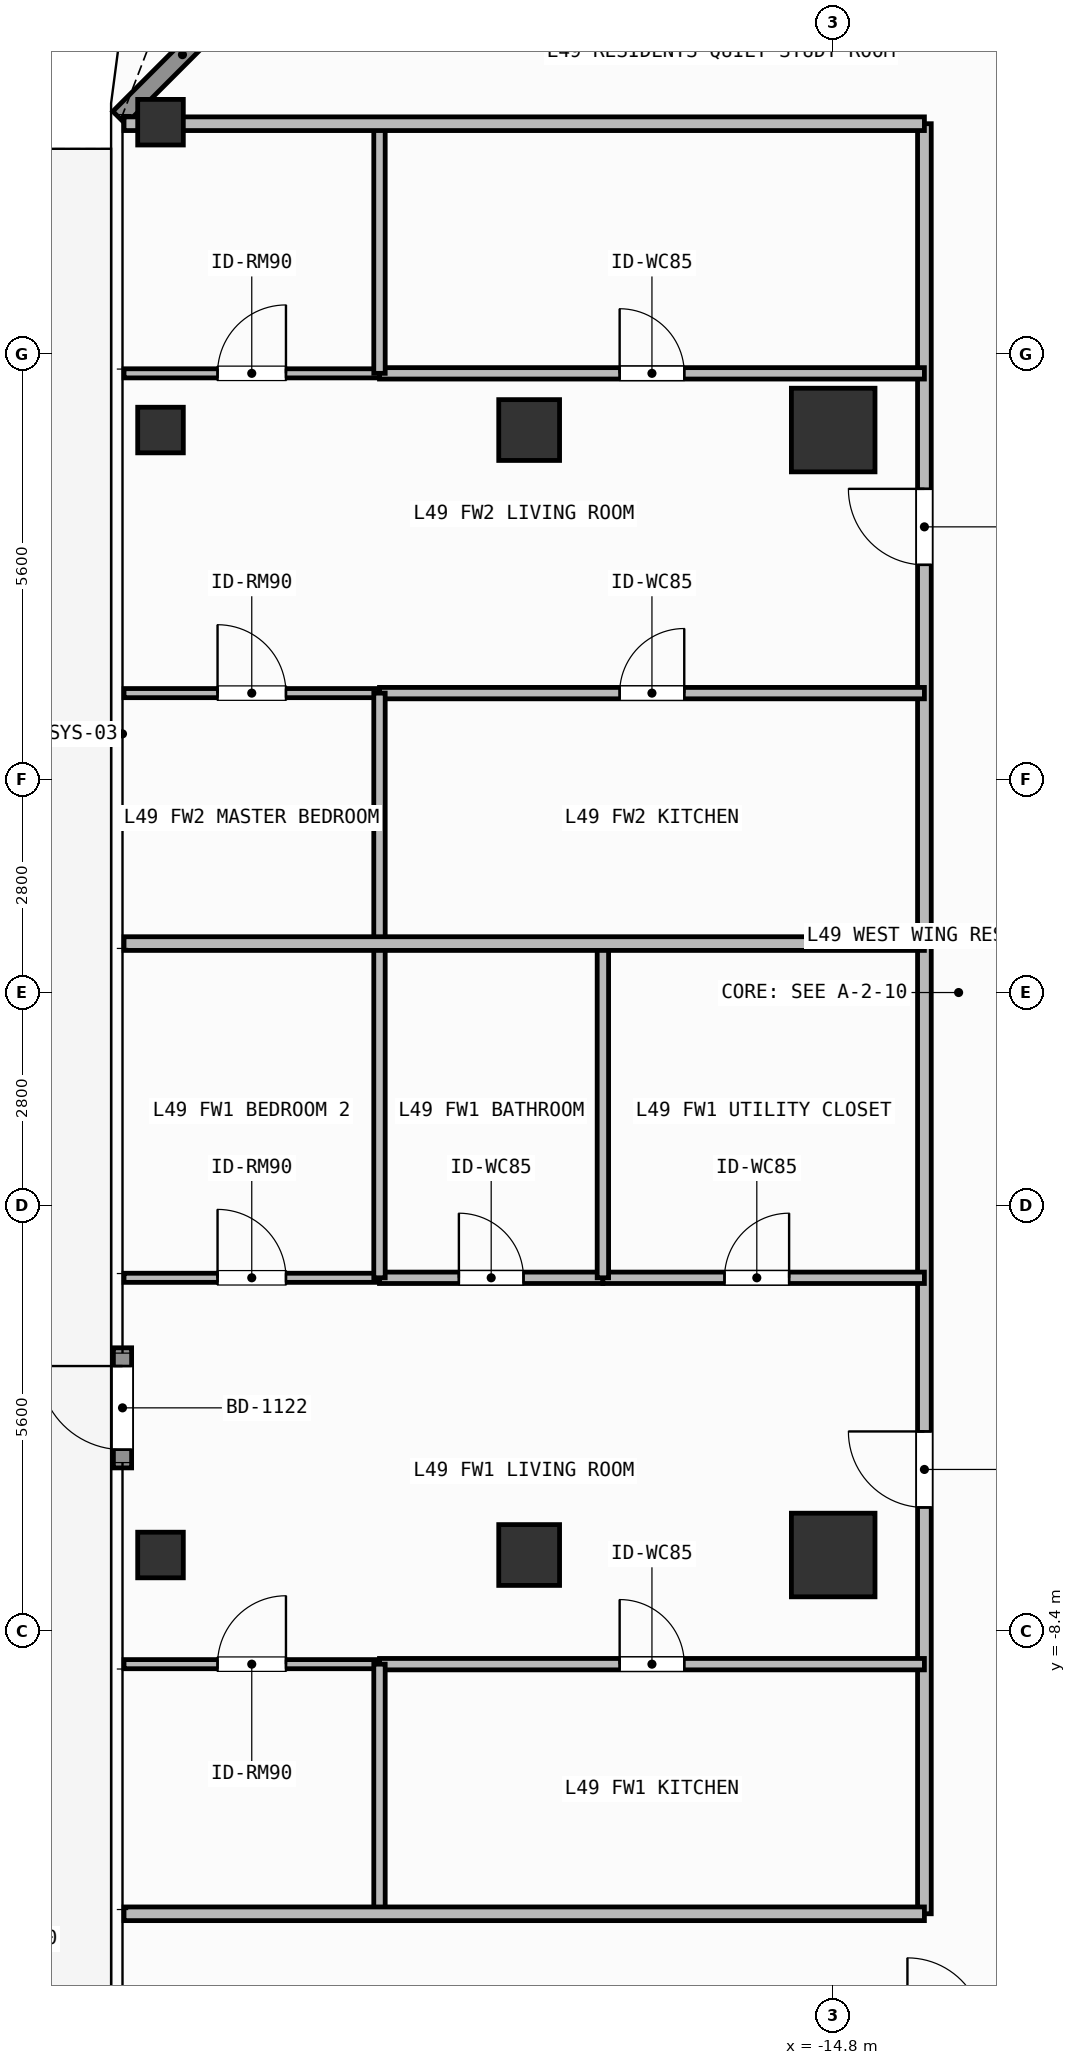
"""IFC4 building model, lengths in metres.
Left out: names, types, materials, properties, quantities, classifications, styles, units other than length and angle.
Written with IfcOpenShell. Run it as: python <this file> out.ifc"""

import sys

from ifc_helpers import new_model, si_unit, direction, frame, frame_2d, origin, origin_2d, place, context, subcontext, project, spatial, rectangle, hollow_rectangle, extrude, element, fill, save


model = new_model("IFC4")
c1 = context("Model", 3, precision=1e-05, world=origin(), true_north=direction((0.0, 1.0)))
c2 = subcontext(c1, "Body", "Model", "MODEL_VIEW")
j1 = project(units=[si_unit("LENGTHUNIT", "METRE"), si_unit("PLANEANGLEUNIT", "RADIAN")], contexts=[c1])
p1 = place(None, origin())
s1 = spatial("IfcSite", under=j1, at=p1, CompositionType="ELEMENT")
p2 = place(p1, origin())
s2 = spatial("IfcBuilding", under=s1, at=p2, CompositionType="ELEMENT")
p3 = place(p2, frame((0.0, 0.0, 199.2)))
s3 = spatial("IfcBuildingStorey", under=s2, at=p3, CompositionType="ELEMENT", Elevation=199.2)
for number, where, z_axis, x_axis in (
    (1, (-14.8, -7.4, 0.0), (0.0, 0.0, 1.0), (1.0, 0.0, 0.0)),
    (2, (-14.8, 7.4, 0.0), (0.0, 0.0, 1.0), (1.0, 0.0, 0.0)),
):
    element("IfcColumn", number, at=place(p3, frame(where, z_axis=z_axis, x_axis=x_axis)), inside=s3, PredefinedType="COLUMN", context=c2, shape_type="SweptSolid", body=[
        extrude(rectangle(XDim=1.1, YDim=1.1, at=origin_2d()), origin(), (0.0, 0.0, 1.0), 3.9),
    ])
for number, where, z_axis, x_axis in (
    (3, (-18.8, -7.4, 0.0), (0.0, 0.0, 1.0), (1.0, 0.0, 0.0)),
    (4, (-18.8, 7.4, 0.0), (0.0, 0.0, 1.0), (1.0, 0.0, 0.0)),
):
    element("IfcColumn", number, at=place(p3, frame(where, z_axis=z_axis, x_axis=x_axis)), inside=s3, PredefinedType="COLUMN", context=c2, shape_type="SweptSolid", body=[
        extrude(hollow_rectangle(XDim=0.8, YDim=0.8, WallThickness=0.036, at=origin_2d()), origin(), (0.0, 0.0, 1.0), 3.9),
    ])
for number, where, z_axis, x_axis in (
    (5, (-23.65, 11.45, 0.0), (0.0, 0.0, 1.0), (1.0, 0.0, 0.0)),
    (6, (-23.65, -7.4, 0.0), (0.0, 0.0, 1.0), (1.0, 0.0, 0.0)),
    (7, (-23.65, 7.4, 0.0), (0.0, 0.0, 1.0), (1.0, 0.0, 0.0)),
):
    element("IfcColumn", number, at=place(p3, frame(where, z_axis=z_axis, x_axis=x_axis)), inside=s3, PredefinedType="COLUMN", context=c2, shape_type="SweptSolid", body=[
        extrude(hollow_rectangle(XDim=0.6, YDim=0.6, WallThickness=0.028, at=origin_2d()), origin(), (0.0, 0.0, 1.0), 3.9),
    ])
p4 = place(p3, frame((-24.15, -6.254, 0.0), z_axis=(0.0, 0.0, 1.0), x_axis=(0.0, 1.0, 0.0)))
e8 = element("IfcWall", 8, at=p4, inside=s3, PredefinedType="SOLIDWALL", context=c2, shape_type="SweptSolid", body=[
    extrude(rectangle(XDim=1.58, YDim=0.24, at=frame_2d((0.79, 0.0))), origin(), (0.0, 0.0, 1.0), 3.68),
])
p5 = place(p4, frame((0.24, 0.0, 0.0)))
e9 = element("IfcOpeningElement", 9, at=p5, cuts=e8, PredefinedType="OPENING", context=c2, shape_type="SweptSolid", body=[
    extrude(rectangle(XDim=1.1, YDim=2.2, at=frame_2d((0.55, 1.1))), frame((0.0, 0.13, 0.0), z_axis=(0.0, -1.0, 0.0), x_axis=(1.0, 0.0, 0.0)), (0.0, 0.0, 1.0), 0.26),
])
p6 = place(p3, frame((-24.192, 11.508, 0.0), z_axis=(0.0, 0.0, 1.0), x_axis=(0.707106781187, 0.707106781187, 0.0)))
e10 = element("IfcWall", 10, at=p6, inside=s3, PredefinedType="SOLIDWALL", context=c2, shape_type="SweptSolid", body=[
    extrude(rectangle(XDim=6.201, YDim=0.24, at=frame_2d((3.101, 0.0))), origin(), (0.0, 0.0, 1.0), 3.68),
])
p7 = place(p6, frame((2.351, 0.0, 0.8)))
e11 = element("IfcOpeningElement", 11, at=p7, cuts=e10, PredefinedType="OPENING", context=c2, shape_type="SweptSolid", body=[
    extrude(rectangle(XDim=1.5, YDim=1.85, at=frame_2d((0.75, 0.925))), frame((0.0, 0.13, 0.0), z_axis=(0.0, -1.0, 0.0), x_axis=(1.0, 0.0, 0.0)), (0.0, 0.0, 1.0), 0.26),
])
p8 = place(p3, frame((-13.6, -12.12, 0.0), z_axis=(0.0, 0.0, 1.0), x_axis=(0.0, 1.0, 0.0)))
e12 = element("IfcWall", 12, at=p8, inside=s3, PredefinedType="PARTITIONING", context=c2, shape_type="SweptSolid", body=[
    extrude(rectangle(XDim=12.764, YDim=0.18, at=frame_2d((6.382, 0.0))), origin(), (0.0, 0.0, 1.0), 3.68),
])
p9 = place(p8, frame((5.346, 0.0, 0.0)))
e13 = element("IfcOpeningElement", 13, at=p9, cuts=e12, PredefinedType="OPENING", context=c2, shape_type="SweptSolid", body=[
    extrude(rectangle(XDim=1.0, YDim=2.2, at=frame_2d((0.5, 1.1))), frame((0.0, 0.1, 0.0), z_axis=(0.0, -1.0, 0.0), x_axis=(1.0, 0.0, 0.0)), (0.0, 0.0, 1.0), 0.2),
])
p10 = place(p3, frame((-20.769, -3.753, 0.0), z_axis=(0.0, 0.0, 1.0), x_axis=(1.0, 0.0, 0.0)))
e14 = element("IfcWall", 14, at=p10, inside=s3, PredefinedType="PARTITIONING", context=c2, shape_type="SweptSolid", body=[
    extrude(rectangle(XDim=2.939, YDim=0.15, at=frame_2d((1.469, 0.0))), origin(), (0.0, 0.0, 1.0), 3.68),
])
p11 = place(p10, frame((1.044, 0.0, 0.0)))
e15 = element("IfcOpeningElement", 15, at=p11, cuts=e14, PredefinedType="OPENING", context=c2, shape_type="SweptSolid", body=[
    extrude(rectangle(XDim=0.85, YDim=2.1, at=frame_2d((0.425, 1.05))), frame((0.0, 0.085, 0.0), z_axis=(0.0, -1.0, 0.0), x_axis=(1.0, 0.0, 0.0)), (0.0, 0.0, 1.0), 0.17),
])
p12 = place(p3, frame((-17.83, -3.753, 0.0), z_axis=(0.0, 0.0, 1.0), x_axis=(1.0, 0.0, 0.0)))
e16 = element("IfcWall", 16, at=p12, inside=s3, PredefinedType="PARTITIONING", context=c2, shape_type="SweptSolid", body=[
    extrude(rectangle(XDim=4.23, YDim=0.15, at=frame_2d((2.115, 0.0))), origin(), (0.0, 0.0, 1.0), 3.68),
])
p13 = place(p12, frame((1.6, 0.0, 0.0)))
e17 = element("IfcOpeningElement", 17, at=p13, cuts=e16, PredefinedType="OPENING", context=c2, shape_type="SweptSolid", body=[
    extrude(rectangle(XDim=0.85, YDim=2.1, at=frame_2d((0.425, 1.05))), frame((0.0, 0.085, 0.0), z_axis=(0.0, -1.0, 0.0), x_axis=(1.0, 0.0, 0.0)), (0.0, 0.0, 1.0), 0.17),
])
p14 = place(p3, frame((-20.769, -8.836, 0.0), z_axis=(0.0, 0.0, 1.0), x_axis=(1.0, 0.0, 0.0)))
e18 = element("IfcWall", 18, at=p14, inside=s3, PredefinedType="PARTITIONING", context=c2, shape_type="SweptSolid", body=[
    extrude(rectangle(XDim=7.169, YDim=0.15, at=frame_2d((3.584, 0.0))), origin(), (0.0, 0.0, 1.0), 3.68),
])
p15 = place(p14, frame((3.159, 0.0, 0.0)))
e19 = element("IfcOpeningElement", 19, at=p15, cuts=e18, PredefinedType="OPENING", context=c2, shape_type="SweptSolid", body=[
    extrude(rectangle(XDim=0.85, YDim=2.1, at=frame_2d((0.425, 1.05))), frame((0.0, 0.085, 0.0), z_axis=(0.0, -1.0, 0.0), x_axis=(1.0, 0.0, 0.0)), (0.0, 0.0, 1.0), 0.17),
])
p16 = place(p3, frame((-24.13, -8.836, 0.0), z_axis=(0.0, 0.0, 1.0), x_axis=(1.0, 0.0, 0.0)))
e20 = element("IfcWall", 20, at=p16, inside=s3, PredefinedType="PARTITIONING", context=c2, shape_type="SweptSolid", body=[
    extrude(rectangle(XDim=3.361, YDim=0.12, at=frame_2d((1.68, 0.0))), origin(), (0.0, 0.0, 1.0), 3.68),
])
p17 = place(p16, frame((1.23, 0.0, 0.0)))
e21 = element("IfcOpeningElement", 21, at=p17, cuts=e20, PredefinedType="OPENING", context=c2, shape_type="SweptSolid", body=[
    extrude(rectangle(XDim=0.9, YDim=2.1, at=frame_2d((0.45, 1.05))), frame((0.0, 0.07, 0.0), z_axis=(0.0, -1.0, 0.0), x_axis=(1.0, 0.0, 0.0)), (0.0, 0.0, 1.0), 0.14),
])
p18 = place(p3, frame((-24.13, -3.753, 0.0), z_axis=(0.0, 0.0, 1.0), x_axis=(1.0, 0.0, 0.0)))
e22 = element("IfcWall", 22, at=p18, inside=s3, PredefinedType="PARTITIONING", context=c2, shape_type="SweptSolid", body=[
    extrude(rectangle(XDim=3.361, YDim=0.12, at=frame_2d((1.68, 0.0))), origin(), (0.0, 0.0, 1.0), 3.68),
])
p19 = place(p18, frame((1.23, 0.0, 0.0)))
e23 = element("IfcOpeningElement", 23, at=p19, cuts=e22, PredefinedType="OPENING", context=c2, shape_type="SweptSolid", body=[
    extrude(rectangle(XDim=0.9, YDim=2.1, at=frame_2d((0.45, 1.05))), frame((0.0, 0.07, 0.0), z_axis=(0.0, -1.0, 0.0), x_axis=(1.0, 0.0, 0.0)), (0.0, 0.0, 1.0), 0.14),
])
p20 = place(p3, frame((-13.6, 0.644, 0.0), z_axis=(0.0, 0.0, 1.0), x_axis=(0.0, 1.0, 0.0)))
e24 = element("IfcWall", 24, at=p20, inside=s3, PredefinedType="PARTITIONING", context=c2, shape_type="SweptSolid", body=[
    extrude(rectangle(XDim=10.786, YDim=0.18, at=frame_2d((5.393, 0.0))), origin(), (0.0, 0.0, 1.0), 3.68),
])
p21 = place(p20, frame((4.982, 0.0, 0.0)))
e25 = element("IfcOpeningElement", 25, at=p21, cuts=e24, PredefinedType="OPENING", context=c2, shape_type="SweptSolid", body=[
    extrude(rectangle(XDim=1.0, YDim=2.2, at=frame_2d((0.5, 1.1))), frame((0.0, 0.1, 0.0), z_axis=(0.0, -1.0, 0.0), x_axis=(1.0, 0.0, 0.0)), (0.0, 0.0, 1.0), 0.2),
])
p22 = place(p3, frame((-20.769, 8.146, 0.0), z_axis=(0.0, 0.0, 1.0), x_axis=(1.0, 0.0, 0.0)))
e26 = element("IfcWall", 26, at=p22, inside=s3, PredefinedType="PARTITIONING", context=c2, shape_type="SweptSolid", body=[
    extrude(rectangle(XDim=7.169, YDim=0.15, at=frame_2d((3.584, 0.0))), origin(), (0.0, 0.0, 1.0), 3.68),
])
p23 = place(p22, frame((3.159, 0.0, 0.0)))
e27 = element("IfcOpeningElement", 27, at=p23, cuts=e26, PredefinedType="OPENING", context=c2, shape_type="SweptSolid", body=[
    extrude(rectangle(XDim=0.85, YDim=2.1, at=frame_2d((0.425, 1.05))), frame((0.0, 0.085, 0.0), z_axis=(0.0, -1.0, 0.0), x_axis=(1.0, 0.0, 0.0)), (0.0, 0.0, 1.0), 0.17),
])
p24 = place(p3, frame((-20.769, 3.939, 0.0), z_axis=(0.0, 0.0, 1.0), x_axis=(1.0, 0.0, 0.0)))
e28 = element("IfcWall", 28, at=p24, inside=s3, PredefinedType="PARTITIONING", context=c2, shape_type="SweptSolid", body=[
    extrude(rectangle(XDim=7.169, YDim=0.15, at=frame_2d((3.584, 0.0))), origin(), (0.0, 0.0, 1.0), 3.68),
])
p25 = place(p24, frame((3.159, 0.0, 0.0)))
e29 = element("IfcOpeningElement", 29, at=p25, cuts=e28, PredefinedType="OPENING", context=c2, shape_type="SweptSolid", body=[
    extrude(rectangle(XDim=0.85, YDim=2.1, at=frame_2d((0.425, 1.05))), frame((0.0, 0.085, 0.0), z_axis=(0.0, -1.0, 0.0), x_axis=(1.0, 0.0, 0.0)), (0.0, 0.0, 1.0), 0.17),
])
p26 = place(p3, frame((-24.13, 3.939, 0.0), z_axis=(0.0, 0.0, 1.0), x_axis=(1.0, 0.0, 0.0)))
e30 = element("IfcWall", 30, at=p26, inside=s3, PredefinedType="PARTITIONING", context=c2, shape_type="SweptSolid", body=[
    extrude(rectangle(XDim=3.361, YDim=0.12, at=frame_2d((1.68, 0.0))), origin(), (0.0, 0.0, 1.0), 3.68),
])
p27 = place(p26, frame((1.23, 0.0, 0.0)))
e31 = element("IfcOpeningElement", 31, at=p27, cuts=e30, PredefinedType="OPENING", context=c2, shape_type="SweptSolid", body=[
    extrude(rectangle(XDim=0.9, YDim=2.1, at=frame_2d((0.45, 1.05))), frame((0.0, 0.07, 0.0), z_axis=(0.0, -1.0, 0.0), x_axis=(1.0, 0.0, 0.0)), (0.0, 0.0, 1.0), 0.14),
])
p28 = place(p3, frame((-24.13, 8.146, 0.0), z_axis=(0.0, 0.0, 1.0), x_axis=(1.0, 0.0, 0.0)))
e32 = element("IfcWall", 32, at=p28, inside=s3, PredefinedType="PARTITIONING", context=c2, shape_type="SweptSolid", body=[
    extrude(rectangle(XDim=3.361, YDim=0.12, at=frame_2d((1.68, 0.0))), origin(), (0.0, 0.0, 1.0), 3.68),
])
p29 = place(p28, frame((1.23, 0.0, 0.0)))
e33 = element("IfcOpeningElement", 33, at=p29, cuts=e32, PredefinedType="OPENING", context=c2, shape_type="SweptSolid", body=[
    extrude(rectangle(XDim=0.9, YDim=2.1, at=frame_2d((0.45, 1.05))), frame((0.0, 0.07, 0.0), z_axis=(0.0, -1.0, 0.0), x_axis=(1.0, 0.0, 0.0)), (0.0, 0.0, 1.0), 0.14),
])
p30 = place(p3, frame((-17.83, -3.753, 0.0), z_axis=(0.0, 0.0, 1.0), x_axis=(0.0, 1.0, 0.0)))
e34 = element("IfcWall", 34, at=p30, inside=s3, PredefinedType="PARTITIONING", context=c2, shape_type="SweptSolid", body=[
    extrude(rectangle(XDim=4.397, YDim=0.15, at=frame_2d((2.198, 0.0))), origin(), (0.0, 0.0, 1.0), 3.68),
])
p31 = place(p3, frame((-20.769, -12.12, 0.0), z_axis=(0.0, 0.0, 1.0), x_axis=(0.0, 1.0, 0.0)))
e35 = element("IfcWall", 35, at=p31, inside=s3, PredefinedType="PARTITIONING", context=c2, shape_type="SweptSolid", body=[
    extrude(rectangle(XDim=3.284, YDim=0.15, at=frame_2d((1.642, 0.0))), origin(), (0.0, 0.0, 1.0), 3.68),
])
p32 = place(p3, frame((-20.769, -3.753, 0.0), z_axis=(0.0, 0.0, 1.0), x_axis=(0.0, 1.0, 0.0)))
e36 = element("IfcWall", 36, at=p32, inside=s3, PredefinedType="PARTITIONING", context=c2, shape_type="SweptSolid", body=[
    extrude(rectangle(XDim=4.397, YDim=0.15, at=frame_2d((2.198, 0.0))), origin(), (0.0, 0.0, 1.0), 3.68),
])
p33 = place(p3, frame((-20.769, 0.644, 0.0), z_axis=(0.0, 0.0, 1.0), x_axis=(0.0, 1.0, 0.0)))
e37 = element("IfcWall", 37, at=p33, inside=s3, PredefinedType="PARTITIONING", context=c2, shape_type="SweptSolid", body=[
    extrude(rectangle(XDim=3.295, YDim=0.15, at=frame_2d((1.647, 0.0))), origin(), (0.0, 0.0, 1.0), 3.68),
])
p34 = place(p3, frame((-20.769, 8.146, 0.0), z_axis=(0.0, 0.0, 1.0), x_axis=(0.0, 1.0, 0.0)))
e38 = element("IfcWall", 38, at=p34, inside=s3, PredefinedType="PARTITIONING", context=c2, shape_type="SweptSolid", body=[
    extrude(rectangle(XDim=3.284, YDim=0.15, at=frame_2d((1.642, 0.0))), origin(), (0.0, 0.0, 1.0), 3.68),
])
for number, where, z_axis, x_axis in (
    (39, (-24.13, 0.644, 0.0), (0.0, 0.0, 1.0), (1.0, 0.0, 0.0)),
    (40, (-24.13, -12.12, 0.0), (0.0, 0.0, 1.0), (1.0, 0.0, 0.0)),
):
    element("IfcWall", number, at=place(p3, frame(where, z_axis=z_axis, x_axis=x_axis)), inside=s3, PredefinedType="PARTITIONING", context=c2, shape_type="SweptSolid", body=[
        extrude(rectangle(XDim=10.53, YDim=0.18, at=frame_2d((5.265, 0.0))), origin(), (0.0, 0.0, 1.0), 3.68),
    ])
p35 = place(p3, frame((-24.13, 11.43, 0.0), z_axis=(0.0, 0.0, 1.0), x_axis=(1.0, 0.0, 0.0)))
e41 = element("IfcWall", 41, at=p35, inside=s3, PredefinedType="PARTITIONING", context=c2, shape_type="SweptSolid", body=[
    extrude(rectangle(XDim=10.53, YDim=0.18, at=frame_2d((5.265, 0.0))), origin(), (0.0, 0.0, 1.0), 3.42),
])
p36 = place(p5, origin())
e42 = element("IfcDoor", 42, at=p36, inside=s3, OperationType="SINGLE_SWING_RIGHT", PredefinedType="DOOR", context=c2, shape_type="SweptSolid", body=[
    extrude(rectangle(XDim=1.1, YDim=2.2, at=frame_2d((0.55, 1.1))), frame((0.0, 0.025, 0.0), z_axis=(0.0, -1.0, 0.0), x_axis=(1.0, 0.0, 0.0)), (0.0, 0.0, 1.0), 0.05),
])
fill(e9, e42)
p37 = place(p9, origin())
e43 = element("IfcDoor", 43, at=p37, inside=s3, OperationType="SINGLE_SWING_RIGHT", PredefinedType="DOOR", context=c2, shape_type="SweptSolid", body=[
    extrude(rectangle(XDim=1.0, YDim=2.2, at=frame_2d((0.5, 1.1))), frame((0.0, 0.025, 0.0), z_axis=(0.0, -1.0, 0.0), x_axis=(1.0, 0.0, 0.0)), (0.0, 0.0, 1.0), 0.05),
])
fill(e13, e43)
p38 = place(p11, origin())
e44 = element("IfcDoor", 44, at=p38, inside=s3, OperationType="SINGLE_SWING_LEFT", PredefinedType="DOOR", context=c2, shape_type="SweptSolid", body=[
    extrude(rectangle(XDim=0.85, YDim=2.1, at=frame_2d((0.425, 1.05))), frame((0.0, 0.025, 0.0), z_axis=(0.0, -1.0, 0.0), x_axis=(1.0, 0.0, 0.0)), (0.0, 0.0, 1.0), 0.05),
])
fill(e15, e44)
p39 = place(p13, origin())
e45 = element("IfcDoor", 45, at=p39, inside=s3, OperationType="SINGLE_SWING_RIGHT", PredefinedType="DOOR", context=c2, shape_type="SweptSolid", body=[
    extrude(rectangle(XDim=0.85, YDim=2.1, at=frame_2d((0.425, 1.05))), frame((0.0, 0.025, 0.0), z_axis=(0.0, -1.0, 0.0), x_axis=(1.0, 0.0, 0.0)), (0.0, 0.0, 1.0), 0.05),
])
fill(e17, e45)
p40 = place(p15, origin())
e46 = element("IfcDoor", 46, at=p40, inside=s3, OperationType="SINGLE_SWING_LEFT", PredefinedType="DOOR", context=c2, shape_type="SweptSolid", body=[
    extrude(rectangle(XDim=0.85, YDim=2.1, at=frame_2d((0.425, 1.05))), frame((0.0, 0.025, 0.0), z_axis=(0.0, -1.0, 0.0), x_axis=(1.0, 0.0, 0.0)), (0.0, 0.0, 1.0), 0.05),
])
fill(e19, e46)
p41 = place(p17, origin())
e47 = element("IfcDoor", 47, at=p41, inside=s3, OperationType="SINGLE_SWING_RIGHT", PredefinedType="DOOR", context=c2, shape_type="SweptSolid", body=[
    extrude(rectangle(XDim=0.9, YDim=2.1, at=frame_2d((0.45, 1.05))), frame((0.0, 0.025, 0.0), z_axis=(0.0, -1.0, 0.0), x_axis=(1.0, 0.0, 0.0)), (0.0, 0.0, 1.0), 0.05),
])
fill(e21, e47)
p42 = place(p19, origin())
e48 = element("IfcDoor", 48, at=p42, inside=s3, OperationType="SINGLE_SWING_LEFT", PredefinedType="DOOR", context=c2, shape_type="SweptSolid", body=[
    extrude(rectangle(XDim=0.9, YDim=2.1, at=frame_2d((0.45, 1.05))), frame((0.0, 0.025, 0.0), z_axis=(0.0, -1.0, 0.0), x_axis=(1.0, 0.0, 0.0)), (0.0, 0.0, 1.0), 0.05),
])
fill(e23, e48)
p43 = place(p21, origin())
e49 = element("IfcDoor", 49, at=p43, inside=s3, OperationType="SINGLE_SWING_RIGHT", PredefinedType="DOOR", context=c2, shape_type="SweptSolid", body=[
    extrude(rectangle(XDim=1.0, YDim=2.2, at=frame_2d((0.5, 1.1))), frame((0.0, 0.025, 0.0), z_axis=(0.0, -1.0, 0.0), x_axis=(1.0, 0.0, 0.0)), (0.0, 0.0, 1.0), 0.05),
])
fill(e25, e49)
p44 = place(p23, origin())
e50 = element("IfcDoor", 50, at=p44, inside=s3, OperationType="SINGLE_SWING_LEFT", PredefinedType="DOOR", context=c2, shape_type="SweptSolid", body=[
    extrude(rectangle(XDim=0.85, YDim=2.1, at=frame_2d((0.425, 1.05))), frame((0.0, 0.025, 0.0), z_axis=(0.0, -1.0, 0.0), x_axis=(1.0, 0.0, 0.0)), (0.0, 0.0, 1.0), 0.05),
])
fill(e27, e50)
p45 = place(p25, origin())
e51 = element("IfcDoor", 51, at=p45, inside=s3, OperationType="SINGLE_SWING_RIGHT", PredefinedType="DOOR", context=c2, shape_type="SweptSolid", body=[
    extrude(rectangle(XDim=0.85, YDim=2.1, at=frame_2d((0.425, 1.05))), frame((0.0, 0.025, 0.0), z_axis=(0.0, -1.0, 0.0), x_axis=(1.0, 0.0, 0.0)), (0.0, 0.0, 1.0), 0.05),
])
fill(e29, e51)
p46 = place(p27, origin())
e52 = element("IfcDoor", 52, at=p46, inside=s3, OperationType="SINGLE_SWING_LEFT", PredefinedType="DOOR", context=c2, shape_type="SweptSolid", body=[
    extrude(rectangle(XDim=0.9, YDim=2.1, at=frame_2d((0.45, 1.05))), frame((0.0, 0.025, 0.0), z_axis=(0.0, -1.0, 0.0), x_axis=(1.0, 0.0, 0.0)), (0.0, 0.0, 1.0), 0.05),
])
fill(e31, e52)
p47 = place(p29, origin())
e53 = element("IfcDoor", 53, at=p47, inside=s3, OperationType="SINGLE_SWING_RIGHT", PredefinedType="DOOR", context=c2, shape_type="SweptSolid", body=[
    extrude(rectangle(XDim=0.9, YDim=2.1, at=frame_2d((0.45, 1.05))), frame((0.0, 0.025, 0.0), z_axis=(0.0, -1.0, 0.0), x_axis=(1.0, 0.0, 0.0)), (0.0, 0.0, 1.0), 0.05),
])
fill(e33, e53)
save(model, sys.argv[1])
